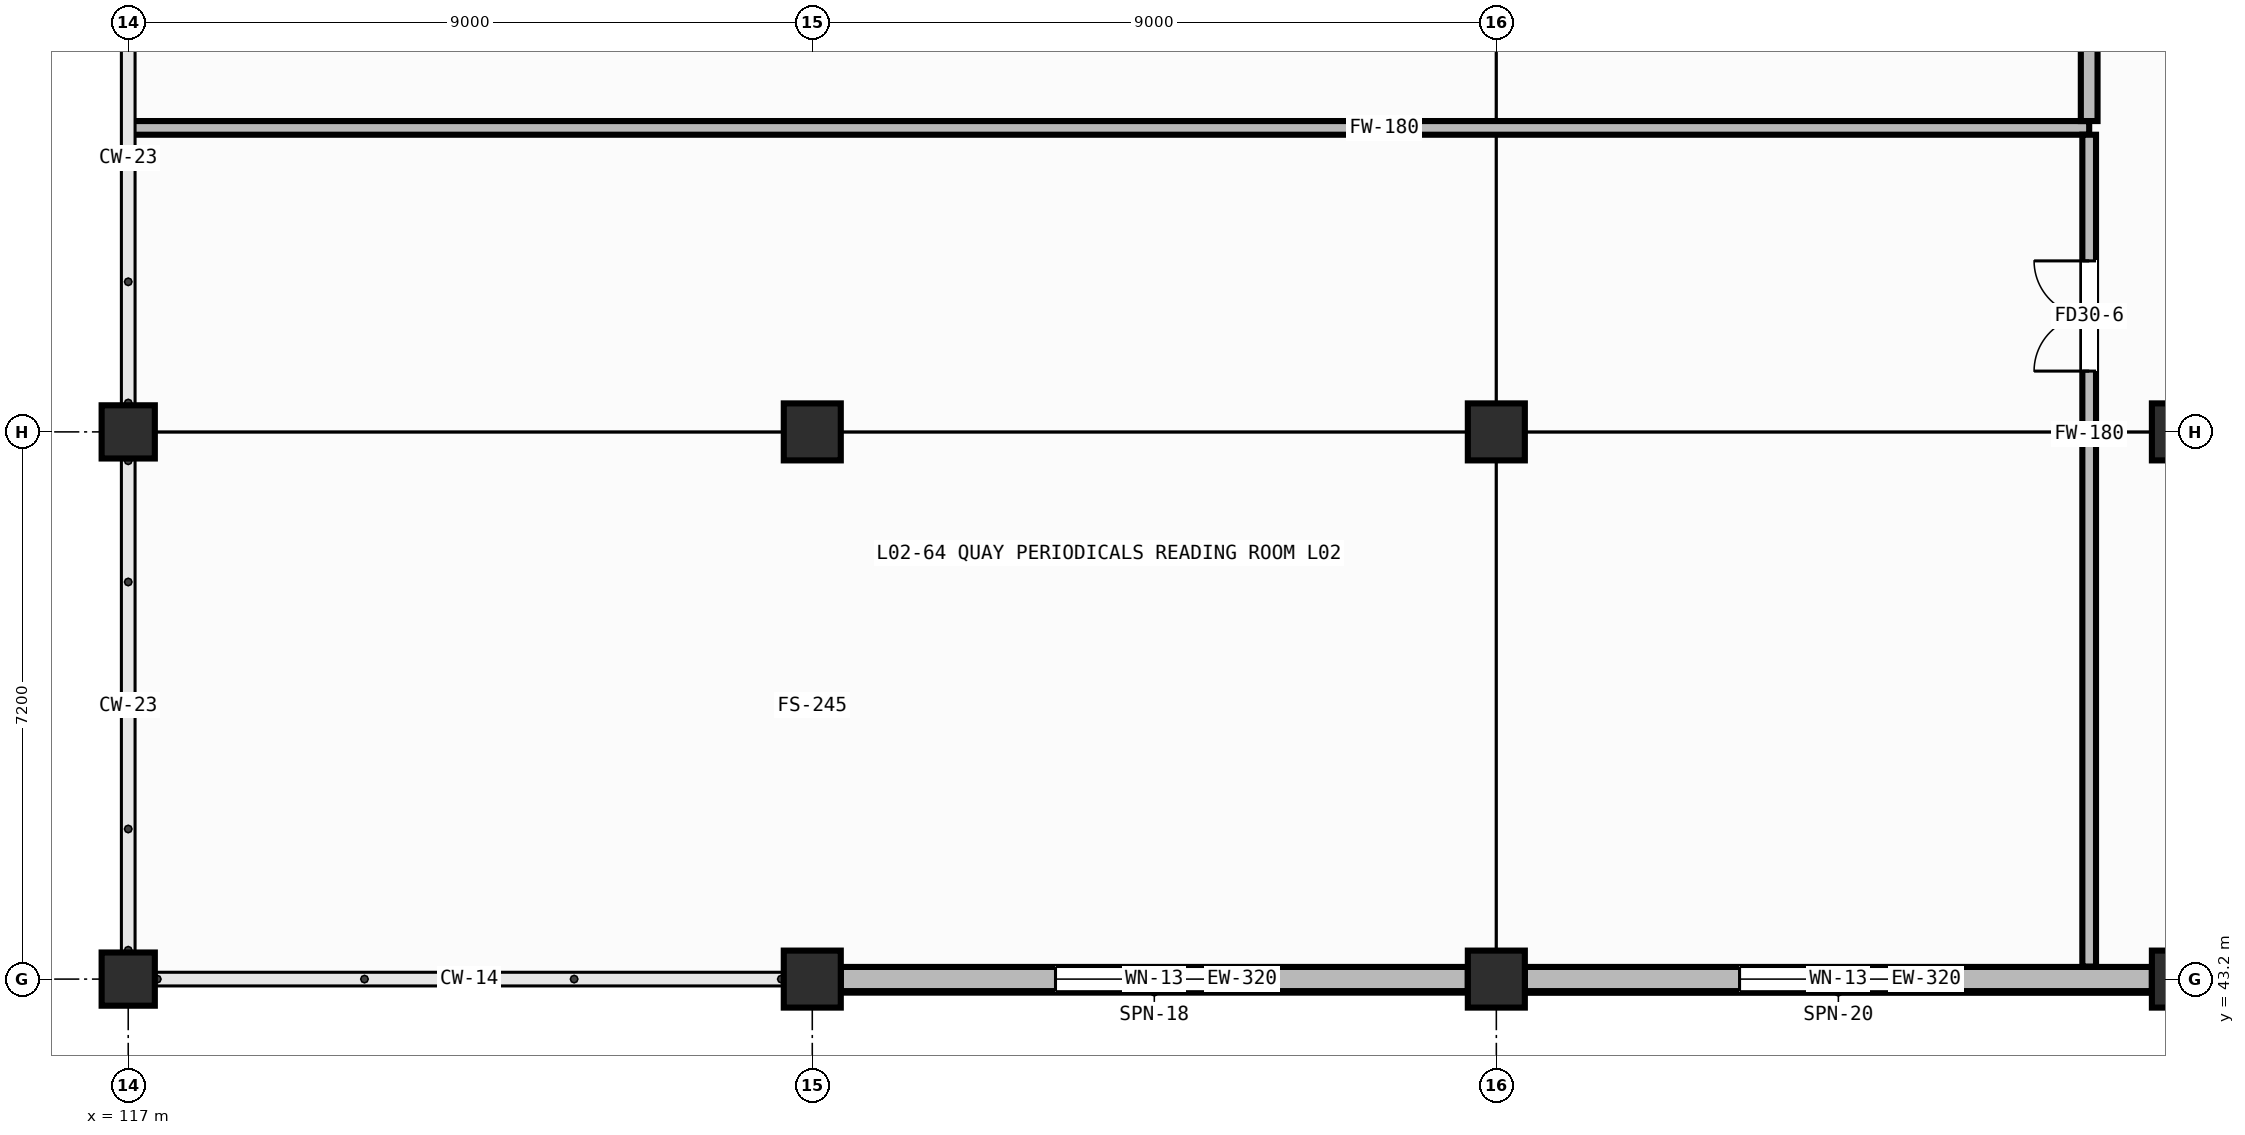
"""IFC4 building model, lengths in metres.
Left out: names, types, materials, properties, quantities, classifications, styles, units other than length and angle.
Written with IfcOpenShell. Run it as: python <this file> out.ifc"""

import sys

from ifc_helpers import new_model, si_unit, direction, frame, frame_2d, origin, origin_2d, place, context, subcontext, project, spatial, rectangle, hollow_rectangle, extrude, element, fill, save


model = new_model("IFC4")
c1 = context("Model", 3, precision=1e-05, world=origin(), true_north=direction((0.0, 1.0)))
c2 = subcontext(c1, "Body", "Model", "MODEL_VIEW")
j1 = project(units=[si_unit("LENGTHUNIT", "METRE"), si_unit("PLANEANGLEUNIT", "RADIAN")], contexts=[c1])
p1 = place(None, origin())
s1 = spatial("IfcSite", under=j1, at=p1, CompositionType="ELEMENT")
p2 = place(p1, origin())
s2 = spatial("IfcBuilding", under=s1, at=p2, CompositionType="ELEMENT")
p3 = place(p2, frame((0.0, 0.0, 4.8)))
s3 = spatial("IfcBuildingStorey", under=s2, at=p3, CompositionType="ELEMENT", Elevation=4.8)
for number, where, z_axis, x_axis in (
    (1, (117.0, 43.2, 0.0), (0.0, 0.0, 1.0), (1.0, 0.0, 0.0)),
    (2, (117.0, 50.4, 0.0), (0.0, 0.0, 1.0), (1.0, 0.0, 0.0)),
):
    element("IfcColumn", number, at=place(p3, frame(where, z_axis=z_axis, x_axis=x_axis)), inside=s3, PredefinedType="COLUMN", context=c2, shape_type="SweptSolid", body=[
        extrude(hollow_rectangle(XDim=0.7, YDim=0.7, WallThickness=0.028, at=origin_2d()), origin(), (0.0, 0.0, 1.0), 4.0),
    ])
for number, where, z_axis, x_axis in (
    (3, (126.0, 43.2, 0.0), (0.0, 0.0, 1.0), (1.0, 0.0, 0.0)),
    (4, (126.0, 50.4, 0.0), (0.0, 0.0, 1.0), (1.0, 0.0, 0.0)),
    (5, (135.0, 43.2, 0.0), (0.0, 0.0, 1.0), (1.0, 0.0, 0.0)),
    (6, (135.0, 50.4, 0.0), (0.0, 0.0, 1.0), (1.0, 0.0, 0.0)),
    (7, (144.0, 43.2, 0.0), (0.0, 0.0, 1.0), (1.0, 0.0, 0.0)),
    (8, (144.0, 50.4, 0.0), (0.0, 0.0, 1.0), (1.0, 0.0, 0.0)),
):
    element("IfcColumn", number, at=place(p3, frame(where, z_axis=z_axis, x_axis=x_axis)), inside=s3, PredefinedType="COLUMN", context=c2, shape_type="SweptSolid", body=[
        extrude(hollow_rectangle(XDim=0.75, YDim=0.75, WallThickness=0.032, at=origin_2d()), origin(), (0.0, 0.0, 1.0), 4.0),
    ])
p4 = place(p3, frame((126.375, 43.2, 0.0), z_axis=(0.0, 0.0, 1.0), x_axis=(1.0, 0.0, 0.0)))
e9 = element("IfcWall", 9, at=p4, inside=s3, PredefinedType="STANDARD", context=c2, shape_type="SweptSolid", body=[
    extrude(rectangle(XDim=8.25, YDim=0.32, at=frame_2d((4.125, 0.0))), origin(), (0.0, 0.0, 1.0), 3.255),
])
p5 = place(p4, frame((2.825, 0.0, 0.85)))
e10 = element("IfcOpeningElement", 10, at=p5, cuts=e9, PredefinedType="OPENING", context=c2, shape_type="SweptSolid", body=[
    extrude(rectangle(XDim=2.6, YDim=1.6, at=frame_2d((1.3, 0.8))), frame((0.0, 0.172, 0.0), z_axis=(0.0, -1.0, 0.0), x_axis=(1.0, 0.0, 0.0)), (0.0, 0.0, 1.0), 0.344),
])
p6 = place(p3, frame((135.375, 43.2, 0.0), z_axis=(0.0, 0.0, 1.0), x_axis=(1.0, 0.0, 0.0)))
e11 = element("IfcWall", 11, at=p6, inside=s3, PredefinedType="STANDARD", context=c2, shape_type="SweptSolid", body=[
    extrude(rectangle(XDim=8.25, YDim=0.32, at=frame_2d((4.125, 0.0))), origin(), (0.0, 0.0, 1.0), 3.255),
])
p7 = place(p6, frame((2.825, 0.0, 0.85)))
e12 = element("IfcOpeningElement", 12, at=p7, cuts=e11, PredefinedType="OPENING", context=c2, shape_type="SweptSolid", body=[
    extrude(rectangle(XDim=2.6, YDim=1.6, at=frame_2d((1.3, 0.8))), frame((0.0, 0.172, 0.0), z_axis=(0.0, -1.0, 0.0), x_axis=(1.0, 0.0, 0.0)), (0.0, 0.0, 1.0), 0.344),
])
p8 = place(p3, frame((117.035, 54.4, 0.0), z_axis=(0.0, 0.0, 1.0), x_axis=(1.0, 0.0, 0.0)))
e13 = element("IfcWall", 13, at=p8, inside=s3, PredefinedType="PARTITIONING", context=c2, shape_type="SweptSolid", body=[
    extrude(rectangle(XDim=25.765, YDim=0.18, at=frame_2d((12.883, 0.0))), origin(), (0.0, 0.0, 1.0), 3.755),
])
p9 = place(p3, frame((142.8, 43.365, 0.0), z_axis=(0.0, 0.0, 1.0), x_axis=(0.0, 1.0, 0.0)))
e14 = element("IfcWall", 14, at=p9, inside=s3, PredefinedType="PARTITIONING", context=c2, shape_type="SweptSolid", body=[
    extrude(rectangle(XDim=10.945, YDim=0.18, at=frame_2d((5.473, 0.0))), origin(), (0.0, 0.0, 1.0), 3.755),
])
p10 = place(p9, frame((7.835, 0.0, 0.0)))
e15 = element("IfcOpeningElement", 15, at=p10, cuts=e14, PredefinedType="OPENING", context=c2, shape_type="SweptSolid", body=[
    extrude(rectangle(XDim=1.45, YDim=2.1, at=frame_2d((0.725, 1.05))), frame((0.0, 0.102, 0.0), z_axis=(0.0, -1.0, 0.0), x_axis=(1.0, 0.0, 0.0)), (0.0, 0.0, 1.0), 0.204),
])
p11 = place(p3, frame((142.8, 54.49, 0.0), z_axis=(0.0, 0.0, 1.0), x_axis=(0.0, 1.0, 0.0)))
e16 = element("IfcWall", 16, at=p11, inside=s3, PredefinedType="PARTITIONING", context=c2, shape_type="SweptSolid", body=[
    extrude(rectangle(XDim=10.82, YDim=0.22, at=frame_2d((5.41, 0.0))), origin(), (0.0, 0.0, 1.0), 3.755),
])
p12 = place(p11, frame((6.035, 0.0, 0.0)))
e17 = element("IfcOpeningElement", 17, at=p12, cuts=e16, PredefinedType="OPENING", context=c2, shape_type="SweptSolid", body=[
    extrude(rectangle(XDim=1.35, YDim=2.08, at=frame_2d((0.675, 1.04))), frame((0.0, 0.122, 0.0), z_axis=(0.0, -1.0, 0.0), x_axis=(1.0, 0.0, 0.0)), (0.0, 0.0, 1.0), 0.244),
])
p13 = place(p5, origin())
e18 = element("IfcWindow", 18, at=p13, inside=s3, PartitioningType="DOUBLE_PANEL_VERTICAL", PredefinedType="WINDOW", context=c2, shape_type="SweptSolid", body=[
    extrude(rectangle(XDim=2.6, YDim=1.6, at=frame_2d((1.3, 0.8))), frame((0.0, 0.03, 0.0), z_axis=(0.0, -1.0, 0.0), x_axis=(1.0, 0.0, 0.0)), (0.0, 0.0, 1.0), 0.06),
])
fill(e10, e18)
p14 = place(p7, origin())
e19 = element("IfcWindow", 19, at=p14, inside=s3, PartitioningType="DOUBLE_PANEL_VERTICAL", PredefinedType="WINDOW", context=c2, shape_type="SweptSolid", body=[
    extrude(rectangle(XDim=2.6, YDim=1.6, at=frame_2d((1.3, 0.8))), frame((0.0, 0.03, 0.0), z_axis=(0.0, -1.0, 0.0), x_axis=(1.0, 0.0, 0.0)), (0.0, 0.0, 1.0), 0.06),
])
fill(e12, e19)
p15 = place(p10, origin())
e20 = element("IfcDoor", 20, at=p15, inside=s3, OperationType="DOUBLE_DOOR_SINGLE_SWING", PredefinedType="DOOR", context=c2, shape_type="SweptSolid", body=[
    extrude(rectangle(XDim=1.45, YDim=2.1, at=frame_2d((0.725, 1.05))), frame((0.0, 0.025, 0.0), z_axis=(0.0, -1.0, 0.0), x_axis=(1.0, 0.0, 0.0)), (0.0, 0.0, 1.0), 0.05),
])
fill(e15, e20)
save(model, sys.argv[1])
